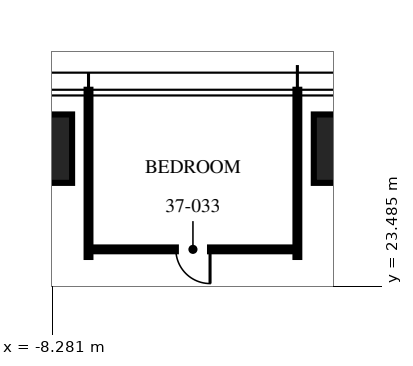
"""IFC4 building model, lengths in metres.
Left out: names, types, materials, properties, quantities, classifications, styles, units other than length and angle.
Written with IfcOpenShell. Run it as: python <this file> out.ifc"""

import sys

from ifc_helpers import new_model, si_unit, direction, frame, frame_2d, origin, origin_2d, place, context, subcontext, project, spatial, rectangle, extrude, element, fill, save


model = new_model("IFC4")
c1 = context("Model", 3, precision=1e-05, world=origin(), true_north=direction((0.0, 1.0)))
c2 = subcontext(c1, "Body", "Model", "MODEL_VIEW")
j1 = project(units=[si_unit("LENGTHUNIT", "METRE"), si_unit("PLANEANGLEUNIT", "RADIAN")], contexts=[c1])
p1 = place(None, origin())
s1 = spatial("IfcSite", under=j1, at=p1, CompositionType="ELEMENT")
p2 = place(p1, origin())
s2 = spatial("IfcBuilding", under=s1, at=p2, CompositionType="ELEMENT")
p3 = place(p2, frame((0.0, 0.0, 148.5)))
s3 = spatial("IfcBuildingStorey", under=s2, at=p3, CompositionType="ELEMENT", Elevation=148.5)
for number, where, z_axis, x_axis in (
    (1, (-9.16, 27.1, 0.0), (0.0, 0.0, 1.0), (1.0, 0.0, 0.0)),
    (2, (0.0, 27.1, 0.0), (0.0, 0.0, 1.0), (1.0, 0.0, 0.0)),
):
    element("IfcColumn", number, at=place(p3, frame(where, z_axis=z_axis, x_axis=x_axis)), inside=s3, PredefinedType="COLUMN", context=c2, shape_type="SweptSolid", body=[
        extrude(rectangle(XDim=2.8, YDim=1.8, at=origin_2d()), origin(), (0.0, 0.0, 1.0), 3.75),
    ])
for number, where, z_axis, x_axis in (
    (3, (-1.832, 24.25, 0.0), (0.0, 0.0, 1.0), (0.0, 1.0, 0.0)),
    (4, (-7.328, 24.25, 0.0), (0.0, 0.0, 1.0), (0.0, 1.0, 0.0)),
):
    element("IfcWall", number, at=place(p3, frame(where, z_axis=z_axis, x_axis=x_axis)), inside=s3, PredefinedType="PARTITIONING", context=c2, shape_type="SweptSolid", body=[
        extrude(rectangle(XDim=4.4, YDim=0.1, at=frame_2d((2.2, 0.0))), origin(), (0.0, 0.0, 1.0), 2.81),
    ])
p4 = place(p3, frame((-1.832, 24.45, 0.0), z_axis=(0.0, 0.0, 1.0), x_axis=(-1.0, 0.0, 0.0)))
e5 = element("IfcWall", 5, at=p4, inside=s3, PredefinedType="PARTITIONING", context=c2, shape_type="SweptSolid", body=[
    extrude(rectangle(XDim=5.496, YDim=0.1, at=frame_2d((2.748, 0.0))), origin(), (0.0, 0.0, 1.0), 2.81),
])
p5 = place(p4, frame((2.298, 0.0, 0.0)))
e6 = element("IfcOpeningElement", 6, at=p5, cuts=e5, PredefinedType="OPENING", context=c2, shape_type="SweptSolid", body=[
    extrude(rectangle(XDim=0.9, YDim=2.1, at=frame_2d((0.45, 1.05))), frame((0.0, 0.06, 0.0), z_axis=(0.0, -1.0, 0.0), x_axis=(1.0, 0.0, 0.0)), (0.0, 0.0, 1.0), 0.12),
])
p6 = place(p5, origin())
e7 = element("IfcDoor", 7, at=p6, inside=s3, OperationType="SINGLE_SWING_LEFT", PredefinedType="DOOR", context=c2, shape_type="SweptSolid", body=[
    extrude(rectangle(XDim=0.9, YDim=2.1, at=frame_2d((0.45, 1.05))), frame((0.0, 0.025, 0.0), z_axis=(0.0, -1.0, 0.0), x_axis=(1.0, 0.0, 0.0)), (0.0, 0.0, 1.0), 0.05),
])
fill(e6, e7)
save(model, sys.argv[1])
